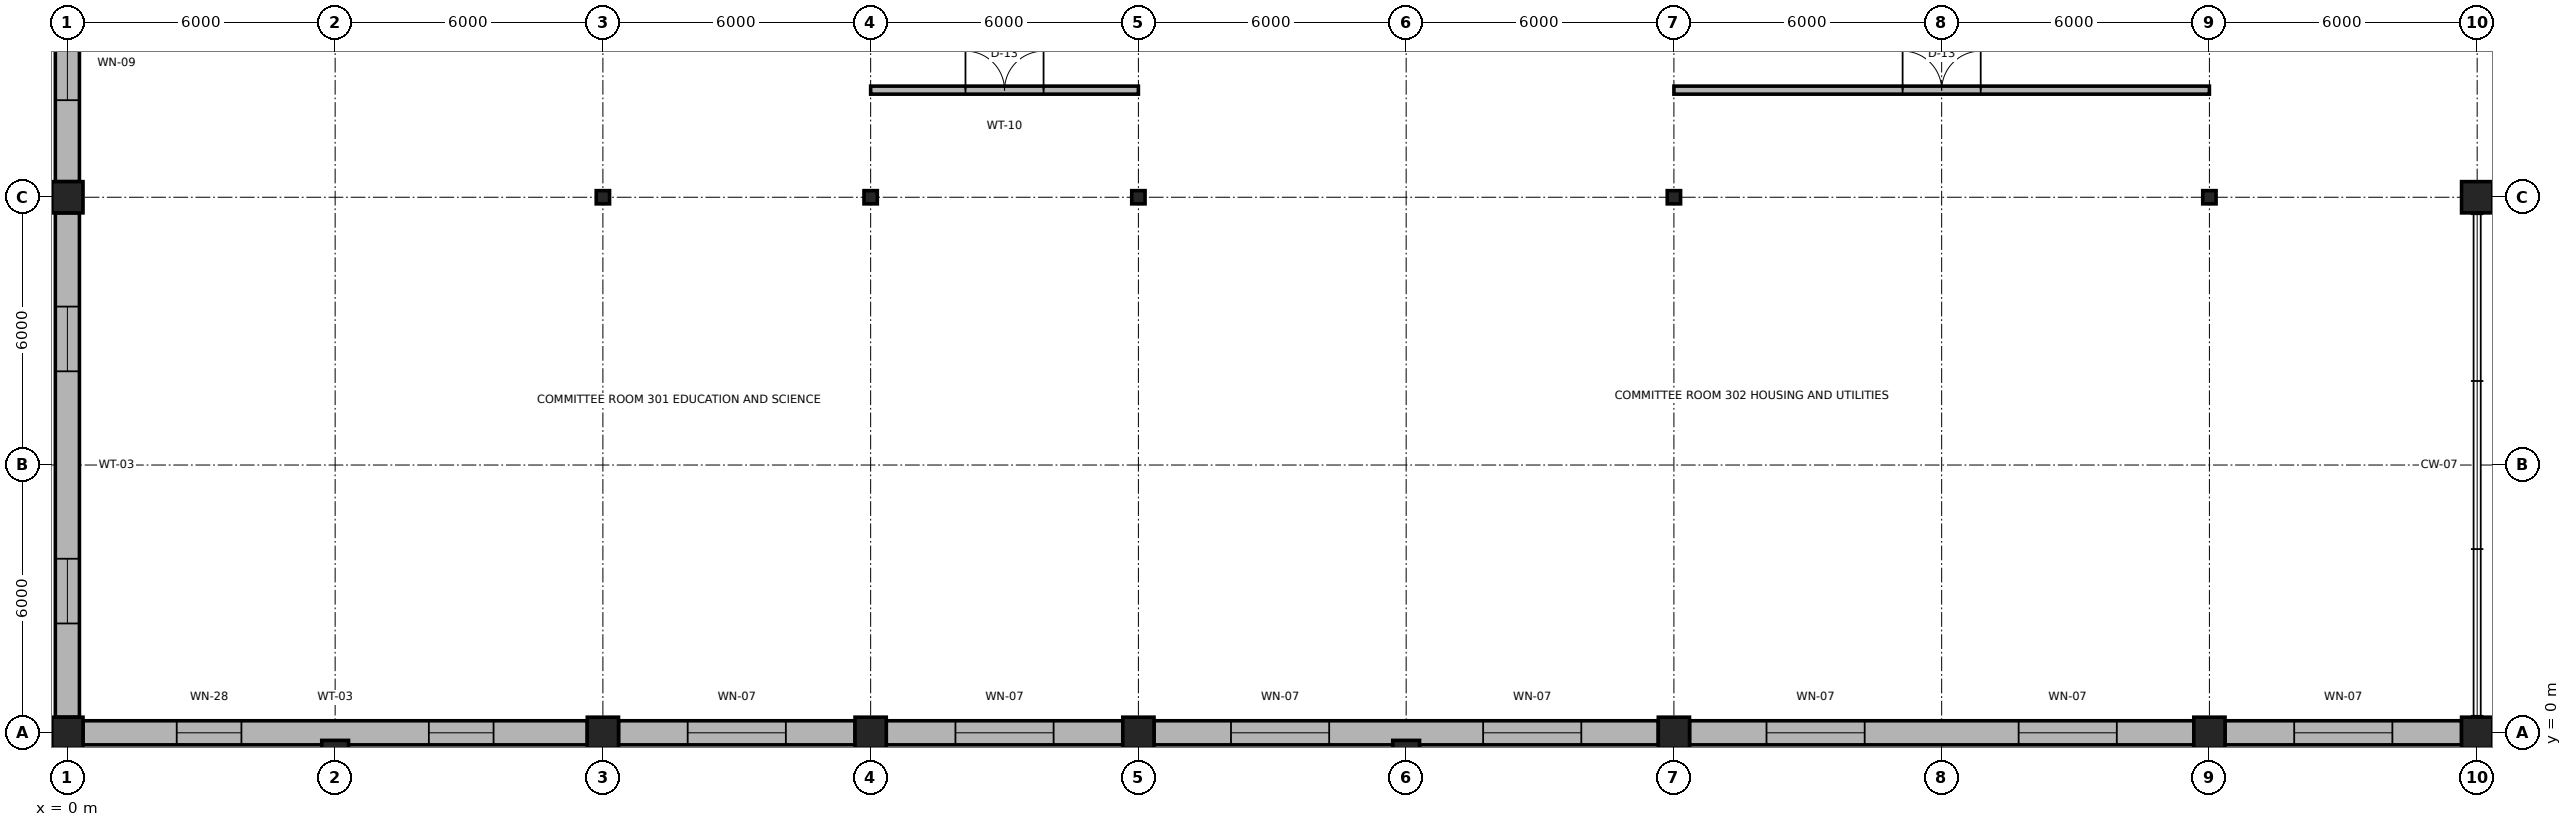
"""IFC4 building model, lengths in metres.
Left out: names, types, materials, properties, quantities, classifications, styles, units other than length and angle.
Written with IfcOpenShell. Run it as: python <this file> out.ifc"""

import sys

from ifc_helpers import new_model, si_unit, direction, frame, frame_2d, origin, origin_2d, place, context, subcontext, project, spatial, rectangle, i_section, extrude, element, fill, save


model = new_model("IFC4")
c1 = context("Model", 3, precision=1e-05, world=origin(), true_north=direction((0.0, 1.0)))
c2 = subcontext(c1, "Body", "Model", "MODEL_VIEW")
j1 = project(units=[si_unit("LENGTHUNIT", "METRE"), si_unit("PLANEANGLEUNIT", "RADIAN")], contexts=[c1])
p1 = place(None, origin())
s1 = spatial("IfcSite", under=j1, at=p1, CompositionType="ELEMENT")
p2 = place(p1, origin())
s2 = spatial("IfcBuilding", under=s1, at=p2, CompositionType="ELEMENT")
p3 = place(p2, frame((0.0, 0.0, 12.0)))
s3 = spatial("IfcBuildingStorey", under=s2, at=p3, CompositionType="ELEMENT", Elevation=12.0)
for number, where, z_axis, x_axis in (
    (1, (0.0, 0.0, 0.0), (0.0, 0.0, 1.0), (1.0, 0.0, 0.0)),
    (2, (12.0, 0.0, 0.0), (0.0, 0.0, 1.0), (1.0, 0.0, 0.0)),
    (3, (18.0, 0.0, 0.0), (0.0, 0.0, 1.0), (1.0, 0.0, 0.0)),
    (4, (24.0, 0.0, 0.0), (0.0, 0.0, 1.0), (1.0, 0.0, 0.0)),
    (5, (36.0, 0.0, 0.0), (0.0, 0.0, 1.0), (1.0, 0.0, 0.0)),
    (6, (48.0, 0.0, 0.0), (0.0, 0.0, 1.0), (1.0, 0.0, 0.0)),
    (7, (54.0, 0.0, 0.0), (0.0, 0.0, 1.0), (1.0, 0.0, 0.0)),
    (8, (0.0, 12.0, 0.0), (0.0, 0.0, 1.0), (1.0, 0.0, 0.0)),
):
    element("IfcColumn", number, at=place(p3, frame(where, z_axis=z_axis, x_axis=x_axis)), inside=s3, PredefinedType="COLUMN", context=c2, shape_type="SweptSolid", body=[
        extrude(rectangle(XDim=0.7, YDim=0.7, at=origin_2d()), origin(), (0.0, 0.0, 1.0), 4.5),
    ])
for number, where, z_axis, x_axis in (
    (9, (12.0, 12.0, 0.0), (0.0, 0.0, 1.0), (1.0, 0.0, 0.0)),
    (10, (18.0, 12.0, 0.0), (0.0, 0.0, 1.0), (1.0, 0.0, 0.0)),
    (11, (24.0, 12.0, 0.0), (0.0, 0.0, 1.0), (1.0, 0.0, 0.0)),
    (12, (36.0, 12.0, 0.0), (0.0, 0.0, 1.0), (1.0, 0.0, 0.0)),
    (13, (48.0, 12.0, 0.0), (0.0, 0.0, 1.0), (1.0, 0.0, 0.0)),
):
    element("IfcColumn", number, at=place(p3, frame(where, z_axis=z_axis, x_axis=x_axis)), inside=s3, PredefinedType="COLUMN", context=c2, shape_type="SweptSolid", body=[
        extrude(i_section(OverallWidth=0.299, OverallDepth=0.296, WebThickness=0.009, FlangeThickness=0.014, FilletRadius=0.018, at=origin_2d()), origin(), (0.0, 0.0, 1.0), 4.5),
    ])
p4 = place(p3, frame((54.0, 12.0, 0.0), z_axis=(0.0, 0.0, 1.0), x_axis=(1.0, 0.0, 0.0)))
e14 = element("IfcColumn", 14, at=p4, inside=s3, PredefinedType="COLUMN", context=c2, shape_type="SweptSolid", body=[
    extrude(rectangle(XDim=0.7, YDim=0.7, at=origin_2d()), origin(), (0.0, 0.0, 1.0), 4.5),
])
for number, where, z_axis, x_axis in (
    (15, (6.0, -0.35, 0.0), (0.0, 0.0, 1.0), (1.0, 0.0, 0.0)),
    (16, (30.0, -0.35, 0.0), (0.0, 0.0, 1.0), (1.0, 0.0, 0.0)),
):
    element("IfcColumn", number, at=place(p3, frame(where, z_axis=z_axis, x_axis=x_axis)), inside=s3, PredefinedType="PILASTER", context=c2, shape_type="SweptSolid", body=[
        extrude(rectangle(XDim=0.6, YDim=0.36, at=origin_2d()), origin(), (0.0, 0.0, 1.0), 4.22),
    ])
p5 = place(p3, frame((0.35, 0.0, 0.0), z_axis=(0.0, 0.0, 1.0), x_axis=(1.0, 0.0, 0.0)))
e17 = element("IfcWall", 17, at=p5, inside=s3, PredefinedType="SOLIDWALL", context=c2, shape_type="SweptSolid", body=[
    extrude(rectangle(XDim=11.3, YDim=0.54, at=frame_2d((5.65, 0.0))), origin(), (0.0, 0.0, 1.0), 3.77),
])
p6 = place(p5, frame((2.1, 0.0, 0.85)))
e18 = element("IfcOpeningElement", 18, at=p6, cuts=e17, PredefinedType="OPENING", context=c2, shape_type="SweptSolid", body=[
    extrude(rectangle(XDim=1.45, YDim=2.15, at=frame_2d((0.725, 1.075))), frame((0.0, 0.285, 0.0), z_axis=(0.0, -1.0, 0.0), x_axis=(1.0, 0.0, 0.0)), (0.0, 0.0, 1.0), 0.57),
])
p7 = place(p5, frame((7.75, 0.0, 0.85)))
e19 = element("IfcOpeningElement", 19, at=p7, cuts=e17, PredefinedType="OPENING", context=c2, shape_type="SweptSolid", body=[
    extrude(rectangle(XDim=1.45, YDim=2.15, at=frame_2d((0.725, 1.075))), frame((0.0, 0.285, 0.0), z_axis=(0.0, -1.0, 0.0), x_axis=(1.0, 0.0, 0.0)), (0.0, 0.0, 1.0), 0.57),
])
p8 = place(p3, frame((12.35, 0.0, 0.0), z_axis=(0.0, 0.0, 1.0), x_axis=(1.0, 0.0, 0.0)))
e20 = element("IfcWall", 20, at=p8, inside=s3, PredefinedType="SOLIDWALL", context=c2, shape_type="SweptSolid", body=[
    extrude(rectangle(XDim=5.3, YDim=0.54, at=frame_2d((2.65, 0.0))), origin(), (0.0, 0.0, 1.0), 3.77),
])
p9 = place(p8, frame((1.55, 0.0, 0.85)))
e21 = element("IfcOpeningElement", 21, at=p9, cuts=e20, PredefinedType="OPENING", context=c2, shape_type="SweptSolid", body=[
    extrude(rectangle(XDim=2.2, YDim=2.4, at=frame_2d((1.1, 1.2))), frame((0.0, 0.285, 0.0), z_axis=(0.0, -1.0, 0.0), x_axis=(1.0, 0.0, 0.0)), (0.0, 0.0, 1.0), 0.57),
])
p10 = place(p3, frame((18.35, 0.0, 0.0), z_axis=(0.0, 0.0, 1.0), x_axis=(1.0, 0.0, 0.0)))
e22 = element("IfcWall", 22, at=p10, inside=s3, PredefinedType="SOLIDWALL", context=c2, shape_type="SweptSolid", body=[
    extrude(rectangle(XDim=5.3, YDim=0.54, at=frame_2d((2.65, 0.0))), origin(), (0.0, 0.0, 1.0), 3.77),
])
p11 = place(p10, frame((1.55, 0.0, 0.85)))
e23 = element("IfcOpeningElement", 23, at=p11, cuts=e22, PredefinedType="OPENING", context=c2, shape_type="SweptSolid", body=[
    extrude(rectangle(XDim=2.2, YDim=2.4, at=frame_2d((1.1, 1.2))), frame((0.0, 0.285, 0.0), z_axis=(0.0, -1.0, 0.0), x_axis=(1.0, 0.0, 0.0)), (0.0, 0.0, 1.0), 0.57),
])
p12 = place(p3, frame((24.35, 0.0, 0.0), z_axis=(0.0, 0.0, 1.0), x_axis=(1.0, 0.0, 0.0)))
e24 = element("IfcWall", 24, at=p12, inside=s3, PredefinedType="SOLIDWALL", context=c2, shape_type="SweptSolid", body=[
    extrude(rectangle(XDim=11.3, YDim=0.54, at=frame_2d((5.65, 0.0))), origin(), (0.0, 0.0, 1.0), 3.77),
])
p13 = place(p12, frame((1.725, 0.0, 0.85)))
e25 = element("IfcOpeningElement", 25, at=p13, cuts=e24, PredefinedType="OPENING", context=c2, shape_type="SweptSolid", body=[
    extrude(rectangle(XDim=2.2, YDim=2.4, at=frame_2d((1.1, 1.2))), frame((0.0, 0.285, 0.0), z_axis=(0.0, -1.0, 0.0), x_axis=(1.0, 0.0, 0.0)), (0.0, 0.0, 1.0), 0.57),
])
p14 = place(p12, frame((7.375, 0.0, 0.85)))
e26 = element("IfcOpeningElement", 26, at=p14, cuts=e24, PredefinedType="OPENING", context=c2, shape_type="SweptSolid", body=[
    extrude(rectangle(XDim=2.2, YDim=2.4, at=frame_2d((1.1, 1.2))), frame((0.0, 0.285, 0.0), z_axis=(0.0, -1.0, 0.0), x_axis=(1.0, 0.0, 0.0)), (0.0, 0.0, 1.0), 0.57),
])
p15 = place(p3, frame((36.35, 0.0, 0.0), z_axis=(0.0, 0.0, 1.0), x_axis=(1.0, 0.0, 0.0)))
e27 = element("IfcWall", 27, at=p15, inside=s3, PredefinedType="SOLIDWALL", context=c2, shape_type="SweptSolid", body=[
    extrude(rectangle(XDim=11.3, YDim=0.54, at=frame_2d((5.65, 0.0))), origin(), (0.0, 0.0, 1.0), 3.77),
])
p16 = place(p15, frame((1.725, 0.0, 0.85)))
e28 = element("IfcOpeningElement", 28, at=p16, cuts=e27, PredefinedType="OPENING", context=c2, shape_type="SweptSolid", body=[
    extrude(rectangle(XDim=2.2, YDim=2.4, at=frame_2d((1.1, 1.2))), frame((0.0, 0.285, 0.0), z_axis=(0.0, -1.0, 0.0), x_axis=(1.0, 0.0, 0.0)), (0.0, 0.0, 1.0), 0.57),
])
p17 = place(p15, frame((7.375, 0.0, 0.85)))
e29 = element("IfcOpeningElement", 29, at=p17, cuts=e27, PredefinedType="OPENING", context=c2, shape_type="SweptSolid", body=[
    extrude(rectangle(XDim=2.2, YDim=2.4, at=frame_2d((1.1, 1.2))), frame((0.0, 0.285, 0.0), z_axis=(0.0, -1.0, 0.0), x_axis=(1.0, 0.0, 0.0)), (0.0, 0.0, 1.0), 0.57),
])
p18 = place(p3, frame((48.35, 0.0, 0.0), z_axis=(0.0, 0.0, 1.0), x_axis=(1.0, 0.0, 0.0)))
e30 = element("IfcWall", 30, at=p18, inside=s3, PredefinedType="SOLIDWALL", context=c2, shape_type="SweptSolid", body=[
    extrude(rectangle(XDim=5.3, YDim=0.54, at=frame_2d((2.65, 0.0))), origin(), (0.0, 0.0, 1.0), 3.77),
])
p19 = place(p18, frame((1.55, 0.0, 0.85)))
e31 = element("IfcOpeningElement", 31, at=p19, cuts=e30, PredefinedType="OPENING", context=c2, shape_type="SweptSolid", body=[
    extrude(rectangle(XDim=2.2, YDim=2.4, at=frame_2d((1.1, 1.2))), frame((0.0, 0.285, 0.0), z_axis=(0.0, -1.0, 0.0), x_axis=(1.0, 0.0, 0.0)), (0.0, 0.0, 1.0), 0.57),
])
p20 = place(p3, frame((0.0, 0.35, 0.0), z_axis=(0.0, 0.0, 1.0), x_axis=(0.0, 1.0, 0.0)))
e32 = element("IfcWall", 32, at=p20, inside=s3, PredefinedType="SOLIDWALL", context=c2, shape_type="SweptSolid", body=[
    extrude(rectangle(XDim=11.3, YDim=0.54, at=frame_2d((5.65, 0.0))), origin(), (0.0, 0.0, 1.0), 3.77),
])
p21 = place(p20, frame((2.1, 0.0, 0.85)))
e33 = element("IfcOpeningElement", 33, at=p21, cuts=e32, PredefinedType="OPENING", context=c2, shape_type="SweptSolid", body=[
    extrude(rectangle(XDim=1.45, YDim=2.15, at=frame_2d((0.725, 1.075))), frame((0.0, 0.285, 0.0), z_axis=(0.0, -1.0, 0.0), x_axis=(1.0, 0.0, 0.0)), (0.0, 0.0, 1.0), 0.57),
])
p22 = place(p20, frame((7.75, 0.0, 0.85)))
e34 = element("IfcOpeningElement", 34, at=p22, cuts=e32, PredefinedType="OPENING", context=c2, shape_type="SweptSolid", body=[
    extrude(rectangle(XDim=1.45, YDim=2.15, at=frame_2d((0.725, 1.075))), frame((0.0, 0.285, 0.0), z_axis=(0.0, -1.0, 0.0), x_axis=(1.0, 0.0, 0.0)), (0.0, 0.0, 1.0), 0.57),
])
p23 = place(p3, frame((0.0, 12.35, 0.0), z_axis=(0.0, 0.0, 1.0), x_axis=(0.0, 1.0, 0.0)))
e35 = element("IfcWall", 35, at=p23, inside=s3, PredefinedType="SOLIDWALL", context=c2, shape_type="SweptSolid", body=[
    extrude(rectangle(XDim=5.3, YDim=0.54, at=frame_2d((2.65, 0.0))), origin(), (0.0, 0.0, 1.0), 3.77),
])
p24 = place(p23, frame((1.825, 0.0, 0.85)))
e36 = element("IfcOpeningElement", 36, at=p24, cuts=e35, PredefinedType="OPENING", context=c2, shape_type="SweptSolid", body=[
    extrude(rectangle(XDim=1.65, YDim=2.3, at=frame_2d((0.825, 1.15))), frame((0.0, 0.285, 0.0), z_axis=(0.0, -1.0, 0.0), x_axis=(1.0, 0.0, 0.0)), (0.0, 0.0, 1.0), 0.57),
])
p25 = place(p3, frame((18.0, 14.4, 0.0), z_axis=(0.0, 0.0, 1.0), x_axis=(1.0, 0.0, 0.0)))
e37 = element("IfcWall", 37, at=p25, inside=s3, PredefinedType="PARTITIONING", context=c2, shape_type="SweptSolid", body=[
    extrude(rectangle(XDim=6.0, YDim=0.18, at=frame_2d((3.0, 0.0))), origin(), (0.0, 0.0, 1.0), 4.22),
])
p26 = place(p25, frame((2.125, 0.0, 0.0)))
e38 = element("IfcOpeningElement", 38, at=p26, cuts=e37, PredefinedType="OPENING", context=c2, shape_type="SweptSolid", body=[
    extrude(rectangle(XDim=1.75, YDim=2.55, at=frame_2d((0.875, 1.275))), frame((0.0, 0.105, 0.0), z_axis=(0.0, -1.0, 0.0), x_axis=(1.0, 0.0, 0.0)), (0.0, 0.0, 1.0), 0.21),
])
p27 = place(p3, frame((36.0, 14.4, 0.0), z_axis=(0.0, 0.0, 1.0), x_axis=(1.0, 0.0, 0.0)))
e39 = element("IfcWall", 39, at=p27, inside=s3, PredefinedType="PARTITIONING", context=c2, shape_type="SweptSolid", body=[
    extrude(rectangle(XDim=12.0, YDim=0.18, at=frame_2d((6.0, 0.0))), origin(), (0.0, 0.0, 1.0), 4.22),
])
p28 = place(p27, frame((5.125, 0.0, 0.0)))
e40 = element("IfcOpeningElement", 40, at=p28, cuts=e39, PredefinedType="OPENING", context=c2, shape_type="SweptSolid", body=[
    extrude(rectangle(XDim=1.75, YDim=2.55, at=frame_2d((0.875, 1.275))), frame((0.0, 0.105, 0.0), z_axis=(0.0, -1.0, 0.0), x_axis=(1.0, 0.0, 0.0)), (0.0, 0.0, 1.0), 0.21),
])
p29 = place(p6, origin())
e41 = element("IfcWindow", 41, at=p29, inside=s3, PartitioningType="SINGLE_PANEL", PredefinedType="WINDOW", context=c2, shape_type="SweptSolid", body=[
    extrude(rectangle(XDim=1.45, YDim=2.15, at=frame_2d((0.725, 1.075))), frame((0.0, 0.03, 0.0), z_axis=(0.0, -1.0, 0.0), x_axis=(1.0, 0.0, 0.0)), (0.0, 0.0, 1.0), 0.06),
])
fill(e18, e41)
p30 = place(p7, origin())
e42 = element("IfcWindow", 42, at=p30, inside=s3, PartitioningType="SINGLE_PANEL", PredefinedType="WINDOW", context=c2, shape_type="SweptSolid", body=[
    extrude(rectangle(XDim=1.45, YDim=2.15, at=frame_2d((0.725, 1.075))), frame((0.0, 0.03, 0.0), z_axis=(0.0, -1.0, 0.0), x_axis=(1.0, 0.0, 0.0)), (0.0, 0.0, 1.0), 0.06),
])
fill(e19, e42)
p31 = place(p9, origin())
e43 = element("IfcWindow", 43, at=p31, inside=s3, PartitioningType="SINGLE_PANEL", PredefinedType="WINDOW", context=c2, shape_type="SweptSolid", body=[
    extrude(rectangle(XDim=2.2, YDim=2.4, at=frame_2d((1.1, 1.2))), frame((0.0, 0.03, 0.0), z_axis=(0.0, -1.0, 0.0), x_axis=(1.0, 0.0, 0.0)), (0.0, 0.0, 1.0), 0.06),
])
fill(e21, e43)
p32 = place(p11, origin())
e44 = element("IfcWindow", 44, at=p32, inside=s3, PartitioningType="SINGLE_PANEL", PredefinedType="WINDOW", context=c2, shape_type="SweptSolid", body=[
    extrude(rectangle(XDim=2.2, YDim=2.4, at=frame_2d((1.1, 1.2))), frame((0.0, 0.03, 0.0), z_axis=(0.0, -1.0, 0.0), x_axis=(1.0, 0.0, 0.0)), (0.0, 0.0, 1.0), 0.06),
])
fill(e23, e44)
p33 = place(p13, origin())
e45 = element("IfcWindow", 45, at=p33, inside=s3, PartitioningType="SINGLE_PANEL", PredefinedType="WINDOW", context=c2, shape_type="SweptSolid", body=[
    extrude(rectangle(XDim=2.2, YDim=2.4, at=frame_2d((1.1, 1.2))), frame((0.0, 0.03, 0.0), z_axis=(0.0, -1.0, 0.0), x_axis=(1.0, 0.0, 0.0)), (0.0, 0.0, 1.0), 0.06),
])
fill(e25, e45)
p34 = place(p14, origin())
e46 = element("IfcWindow", 46, at=p34, inside=s3, PartitioningType="SINGLE_PANEL", PredefinedType="WINDOW", context=c2, shape_type="SweptSolid", body=[
    extrude(rectangle(XDim=2.2, YDim=2.4, at=frame_2d((1.1, 1.2))), frame((0.0, 0.03, 0.0), z_axis=(0.0, -1.0, 0.0), x_axis=(1.0, 0.0, 0.0)), (0.0, 0.0, 1.0), 0.06),
])
fill(e26, e46)
p35 = place(p16, origin())
e47 = element("IfcWindow", 47, at=p35, inside=s3, PartitioningType="SINGLE_PANEL", PredefinedType="WINDOW", context=c2, shape_type="SweptSolid", body=[
    extrude(rectangle(XDim=2.2, YDim=2.4, at=frame_2d((1.1, 1.2))), frame((0.0, 0.03, 0.0), z_axis=(0.0, -1.0, 0.0), x_axis=(1.0, 0.0, 0.0)), (0.0, 0.0, 1.0), 0.06),
])
fill(e28, e47)
p36 = place(p17, origin())
e48 = element("IfcWindow", 48, at=p36, inside=s3, PartitioningType="SINGLE_PANEL", PredefinedType="WINDOW", context=c2, shape_type="SweptSolid", body=[
    extrude(rectangle(XDim=2.2, YDim=2.4, at=frame_2d((1.1, 1.2))), frame((0.0, 0.03, 0.0), z_axis=(0.0, -1.0, 0.0), x_axis=(1.0, 0.0, 0.0)), (0.0, 0.0, 1.0), 0.06),
])
fill(e29, e48)
p37 = place(p19, origin())
e49 = element("IfcWindow", 49, at=p37, inside=s3, PartitioningType="SINGLE_PANEL", PredefinedType="WINDOW", context=c2, shape_type="SweptSolid", body=[
    extrude(rectangle(XDim=2.2, YDim=2.4, at=frame_2d((1.1, 1.2))), frame((0.0, 0.03, 0.0), z_axis=(0.0, -1.0, 0.0), x_axis=(1.0, 0.0, 0.0)), (0.0, 0.0, 1.0), 0.06),
])
fill(e31, e49)
p38 = place(p21, origin())
e50 = element("IfcWindow", 50, at=p38, inside=s3, PartitioningType="SINGLE_PANEL", PredefinedType="WINDOW", context=c2, shape_type="SweptSolid", body=[
    extrude(rectangle(XDim=1.45, YDim=2.15, at=frame_2d((0.725, 1.075))), frame((0.0, 0.03, 0.0), z_axis=(0.0, -1.0, 0.0), x_axis=(1.0, 0.0, 0.0)), (0.0, 0.0, 1.0), 0.06),
])
fill(e33, e50)
p39 = place(p22, origin())
e51 = element("IfcWindow", 51, at=p39, inside=s3, PartitioningType="SINGLE_PANEL", PredefinedType="WINDOW", context=c2, shape_type="SweptSolid", body=[
    extrude(rectangle(XDim=1.45, YDim=2.15, at=frame_2d((0.725, 1.075))), frame((0.0, 0.03, 0.0), z_axis=(0.0, -1.0, 0.0), x_axis=(1.0, 0.0, 0.0)), (0.0, 0.0, 1.0), 0.06),
])
fill(e34, e51)
p40 = place(p24, origin())
e52 = element("IfcWindow", 52, at=p40, inside=s3, PartitioningType="SINGLE_PANEL", PredefinedType="WINDOW", context=c2, shape_type="SweptSolid", body=[
    extrude(rectangle(XDim=1.65, YDim=2.3, at=frame_2d((0.825, 1.15))), frame((0.0, 0.03, 0.0), z_axis=(0.0, -1.0, 0.0), x_axis=(1.0, 0.0, 0.0)), (0.0, 0.0, 1.0), 0.06),
])
fill(e36, e52)
p41 = place(p26, origin())
e53 = element("IfcDoor", 53, at=p41, inside=s3, OperationType="DOUBLE_DOOR_SINGLE_SWING", PredefinedType="DOOR", context=c2, shape_type="SweptSolid", body=[
    extrude(rectangle(XDim=1.75, YDim=2.55, at=frame_2d((0.875, 1.275))), frame((0.0, 0.025, 0.0), z_axis=(0.0, -1.0, 0.0), x_axis=(1.0, 0.0, 0.0)), (0.0, 0.0, 1.0), 0.05),
])
fill(e38, e53)
p42 = place(p28, origin())
e54 = element("IfcDoor", 54, at=p42, inside=s3, OperationType="DOUBLE_DOOR_SINGLE_SWING", PredefinedType="DOOR", context=c2, shape_type="SweptSolid", body=[
    extrude(rectangle(XDim=1.75, YDim=2.55, at=frame_2d((0.875, 1.275))), frame((0.0, 0.025, 0.0), z_axis=(0.0, -1.0, 0.0), x_axis=(1.0, 0.0, 0.0)), (0.0, 0.0, 1.0), 0.05),
])
fill(e40, e54)
save(model, sys.argv[1])
